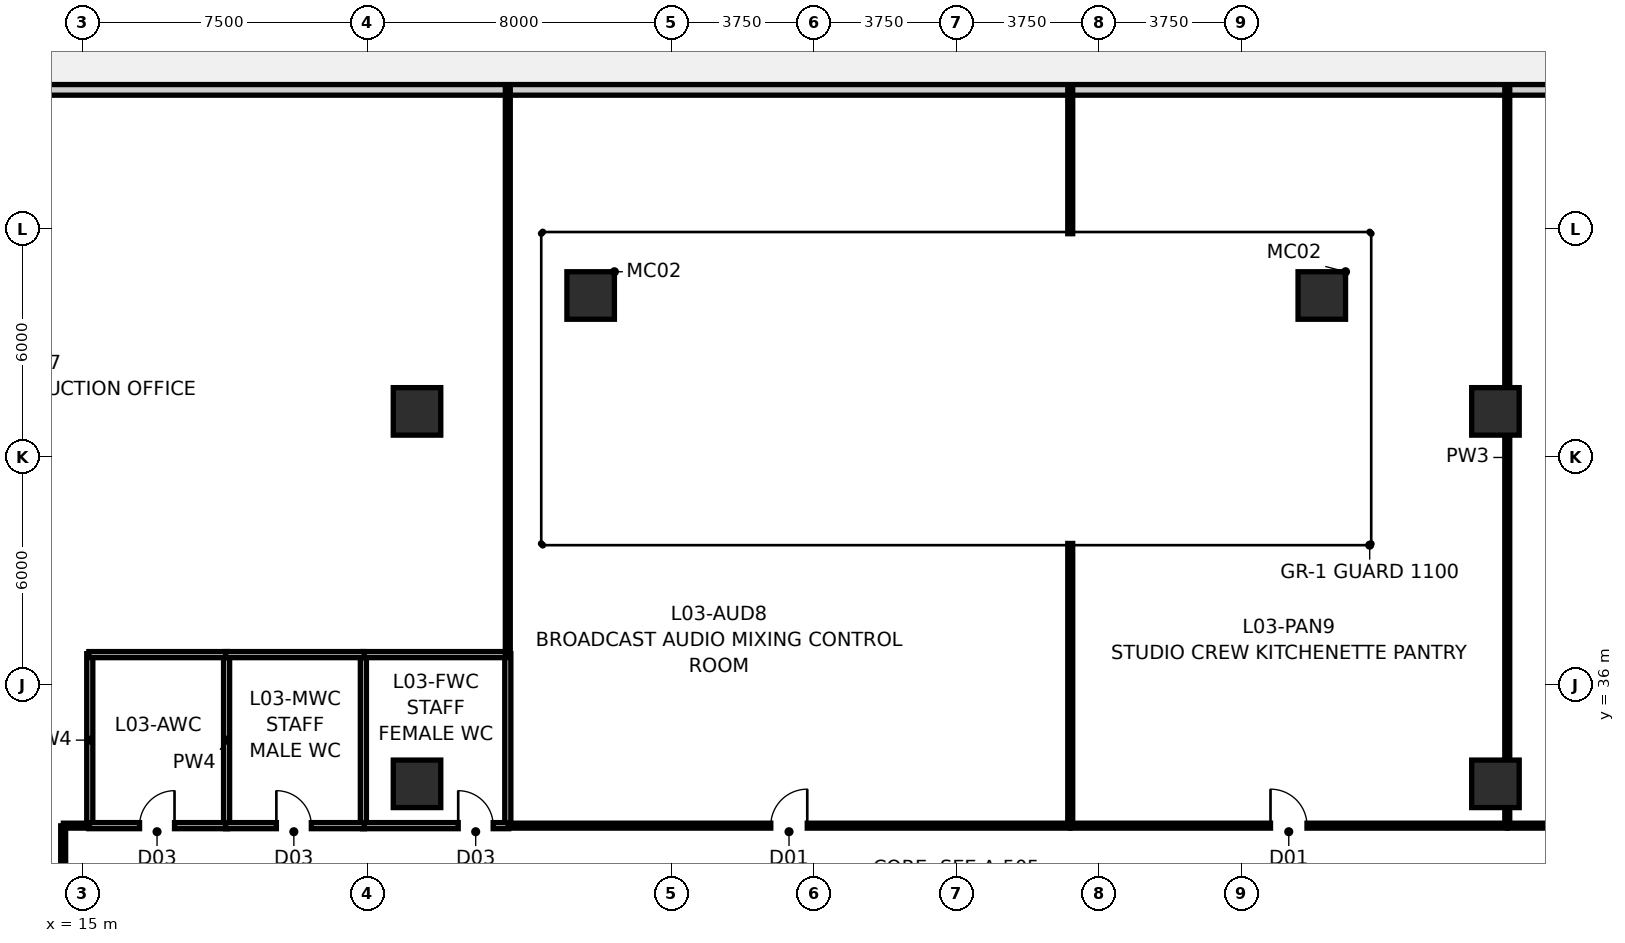
"""IFC4 building model, lengths in metres.
Left out: names, types, materials, properties, quantities, classifications, styles, units other than length and angle.
Written with IfcOpenShell. Run it as: python <this file> out.ifc"""

import sys

from ifc_helpers import new_model, si_unit, direction, frame, frame_2d, origin, origin_2d, place, context, subcontext, project, spatial, rectangle, hollow_rectangle, extrude, source, transform, mapped, element, fill, save


model = new_model("IFC4")
c1 = context("Model", 3, precision=1e-05, world=origin(), true_north=direction((0.0, 1.0)))
c2 = subcontext(c1, "Body", "Model", "MODEL_VIEW")
j1 = project(units=[si_unit("LENGTHUNIT", "METRE"), si_unit("PLANEANGLEUNIT", "RADIAN")], contexts=[c1])
p1 = place(None, origin())
s1 = spatial("IfcSite", under=j1, at=p1, CompositionType="ELEMENT")
p2 = place(p1, origin())
s2 = spatial("IfcBuilding", under=s1, at=p2, CompositionType="ELEMENT")
p3 = place(p2, frame((0.0, 0.0, 14.7)))
s3 = spatial("IfcBuildingStorey", under=s2, at=p3, CompositionType="ELEMENT", Elevation=14.7)
m1 = source(origin(), c2, "Body", "SweptSolid", [
    extrude(hollow_rectangle(XDim=1.25, YDim=1.25, WallThickness=0.07, at=origin_2d()), origin(), (0.0, 0.0, 1.0), 4.201),
])
for number, where, z_axis, x_axis in (
    (1, (47.62, 46.249, 0.0), (-0.024, 0.002, 1.0), (-0.073, -0.997, 0.0)),
    (2, (28.38, 46.249, 0.0), (0.024, 0.002, 1.0), (-0.073, 0.997, 0.0)),
):
    element("IfcColumn", number, at=place(p3, frame(where, z_axis=z_axis, x_axis=x_axis)), inside=s3, PredefinedType="COLUMN", context=c2, shape_type="MappedRepresentation", body=[
        mapped(m1, transform((0.0, 0.0, 0.0), scale=1.0)),
    ])
m2 = source(origin(), c2, "Body", "SweptSolid", [
    extrude(hollow_rectangle(XDim=1.25, YDim=1.25, WallThickness=0.07, at=origin_2d()), origin(), (0.0, 0.0, 1.0), 4.2),
])
for number, where, z_axis, x_axis in (
    (3, (23.811, 33.4, 0.0), (0.0, 0.0, 1.0), (1.0, 0.0, 0.0)),
    (4, (23.811, 43.2, 0.0), (0.0, 0.0, 1.0), (1.0, 0.0, 0.0)),
    (5, (52.189, 33.4, 0.0), (0.0, 0.0, 1.0), (1.0, 0.0, 0.0)),
    (6, (52.189, 43.2, 0.0), (0.0, 0.0, 1.0), (1.0, 0.0, 0.0)),
):
    element("IfcColumn", number, at=place(p3, frame(where, z_axis=z_axis, x_axis=x_axis)), inside=s3, PredefinedType="COLUMN", context=c2, shape_type="MappedRepresentation", body=[
        mapped(m2, transform((0.0, 0.0, 0.0), scale=1.0)),
    ])
p4 = place(p3, frame((8.861, 51.66, 0.0), z_axis=(0.0, 0.0, 1.0), x_axis=(1.0, 0.0, 0.0)))
e7 = element("IfcWall", 7, at=p4, inside=s3, PredefinedType="STANDARD", context=c2, shape_type="SweptSolid", body=[
    extrude(rectangle(XDim=58.878, YDim=0.28, at=frame_2d((29.439, 0.0))), origin(), (0.0, 0.0, 1.0), 3.88),
])
for number, where, z_axis, x_axis in (
    (8, (15.2, 32.275, 0.0), (0.0, 0.0, 1.0), (0.0, 1.0, 0.0)),
    (9, (18.8, 32.275, 0.0), (0.0, 0.0, 1.0), (0.0, 1.0, 0.0)),
    (10, (22.4, 32.275, 0.0), (0.0, 0.0, 1.0), (0.0, 1.0, 0.0)),
    (11, (26.2, 32.275, 0.0), (0.0, 0.0, 1.0), (0.0, 1.0, 0.0)),
):
    element("IfcWall", number, at=place(p3, frame(where, z_axis=z_axis, x_axis=x_axis)), inside=s3, PredefinedType="PLUMBINGWALL", context=c2, shape_type="SweptSolid", body=[
        extrude(rectangle(XDim=4.55, YDim=0.16, at=frame_2d((2.275, 0.0))), origin(), (0.0, 0.0, 1.0), 3.88),
    ])
p5 = place(p3, frame((22.375, 32.3, 0.0), z_axis=(0.0, 0.0, 1.0), x_axis=(1.0, 0.0, 0.0)))
e12 = element("IfcWall", 12, at=p5, inside=s3, PredefinedType="PLUMBINGWALL", context=c2, shape_type="SweptSolid", body=[
    extrude(rectangle(XDim=3.85, YDim=0.16, at=frame_2d((1.925, 0.0))), origin(), (0.0, 0.0, 1.0), 3.88),
])
p6 = place(p5, frame((2.52, 0.0, 0.0)))
e13 = element("IfcOpeningElement", 13, at=p6, cuts=e12, PredefinedType="OPENING", context=c2, shape_type="SweptSolid", body=[
    extrude(rectangle(XDim=0.92, YDim=2.1, at=frame_2d((0.46, 1.05))), frame((0.0, 0.092, 0.0), z_axis=(0.0, -1.0, 0.0), x_axis=(1.0, 0.0, 0.0)), (0.0, 0.0, 1.0), 0.184),
])
p7 = place(p3, frame((22.375, 36.8, 0.0), z_axis=(0.0, 0.0, 1.0), x_axis=(1.0, 0.0, 0.0)))
e14 = element("IfcWall", 14, at=p7, inside=s3, PredefinedType="PLUMBINGWALL", context=c2, shape_type="SweptSolid", body=[
    extrude(rectangle(XDim=3.85, YDim=0.16, at=frame_2d((1.925, 0.0))), origin(), (0.0, 0.0, 1.0), 3.459),
])
p8 = place(p3, frame((15.175, 32.3, 0.0), z_axis=(0.0, 0.0, 1.0), x_axis=(1.0, 0.0, 0.0)))
e15 = element("IfcWall", 15, at=p8, inside=s3, PredefinedType="PLUMBINGWALL", context=c2, shape_type="SweptSolid", body=[
    extrude(rectangle(XDim=3.65, YDim=0.16, at=frame_2d((1.825, 0.0))), origin(), (0.0, 0.0, 1.0), 3.88),
])
p9 = place(p8, frame((1.335, 0.0, 0.0)))
e16 = element("IfcOpeningElement", 16, at=p9, cuts=e15, PredefinedType="OPENING", context=c2, shape_type="SweptSolid", body=[
    extrude(rectangle(XDim=0.92, YDim=2.1, at=frame_2d((0.46, 1.05))), frame((0.0, 0.092, 0.0), z_axis=(0.0, -1.0, 0.0), x_axis=(1.0, 0.0, 0.0)), (0.0, 0.0, 1.0), 0.184),
])
p10 = place(p3, frame((15.175, 36.8, 0.0), z_axis=(0.0, 0.0, 1.0), x_axis=(1.0, 0.0, 0.0)))
e17 = element("IfcWall", 17, at=p10, inside=s3, PredefinedType="PLUMBINGWALL", context=c2, shape_type="SweptSolid", body=[
    extrude(rectangle(XDim=3.65, YDim=0.16, at=frame_2d((1.825, 0.0))), origin(), (0.0, 0.0, 1.0), 3.88),
])
p11 = place(p3, frame((18.775, 32.3, 0.0), z_axis=(0.0, 0.0, 1.0), x_axis=(1.0, 0.0, 0.0)))
e18 = element("IfcWall", 18, at=p11, inside=s3, PredefinedType="PLUMBINGWALL", context=c2, shape_type="SweptSolid", body=[
    extrude(rectangle(XDim=3.65, YDim=0.16, at=frame_2d((1.825, 0.0))), origin(), (0.0, 0.0, 1.0), 3.88),
])
p12 = place(p11, frame((1.335, 0.0, 0.0)))
e19 = element("IfcOpeningElement", 19, at=p12, cuts=e18, PredefinedType="OPENING", context=c2, shape_type="SweptSolid", body=[
    extrude(rectangle(XDim=0.92, YDim=2.1, at=frame_2d((0.46, 1.05))), frame((0.0, 0.092, 0.0), z_axis=(0.0, -1.0, 0.0), x_axis=(1.0, 0.0, 0.0)), (0.0, 0.0, 1.0), 0.184),
])
p13 = place(p3, frame((18.775, 36.8, 0.0), z_axis=(0.0, 0.0, 1.0), x_axis=(1.0, 0.0, 0.0)))
e20 = element("IfcWall", 20, at=p13, inside=s3, PredefinedType="PLUMBINGWALL", context=c2, shape_type="SweptSolid", body=[
    extrude(rectangle(XDim=3.65, YDim=0.16, at=frame_2d((1.825, 0.0))), origin(), (0.0, 0.0, 1.0), 3.88),
])
p14 = place(p3, frame((52.5, 32.305, 0.0), z_axis=(0.0, 0.0, 1.0), x_axis=(0.0, 1.0, 0.0)))
e21 = element("IfcWall", 21, at=p14, inside=s3, PredefinedType="PARTITIONING", context=c2, shape_type="SweptSolid", body=[
    extrude(rectangle(XDim=19.365, YDim=0.13, at=frame_2d((9.683, 0.0))), origin(), (0.0, 0.0, 1.0), 2.865),
])
p15 = place(p3, frame((26.2, 36.805, 0.0), z_axis=(0.0, 0.0, 1.0), x_axis=(0.0, 1.0, 0.0)))
e22 = element("IfcWall", 22, at=p15, inside=s3, PredefinedType="PARTITIONING", context=c2, shape_type="SweptSolid", body=[
    extrude(rectangle(XDim=14.865, YDim=0.13, at=frame_2d((7.433, 0.0))), origin(), (0.0, 0.0, 1.0), 3.88),
])
p16 = place(p3, frame((26.205, 32.3, 0.0), z_axis=(0.0, 0.0, 1.0), x_axis=(1.0, 0.0, 0.0)))
e23 = element("IfcWall", 23, at=p16, inside=s3, PredefinedType="PARTITIONING", context=c2, shape_type="SweptSolid", body=[
    extrude(rectangle(XDim=14.79, YDim=0.13, at=frame_2d((7.395, 0.0))), origin(), (0.0, 0.0, 1.0), 3.88),
])
p17 = place(p16, frame((6.915, 0.0, 0.0)))
e24 = element("IfcOpeningElement", 24, at=p17, cuts=e23, PredefinedType="OPENING", context=c2, shape_type="SweptSolid", body=[
    extrude(rectangle(XDim=0.96, YDim=2.15, at=frame_2d((0.48, 1.075))), frame((0.0, 0.077, 0.0), z_axis=(0.0, -1.0, 0.0), x_axis=(1.0, 0.0, 0.0)), (0.0, 0.0, 1.0), 0.154),
])
p18 = place(p3, frame((41.005, 32.3, 0.0), z_axis=(0.0, 0.0, 1.0), x_axis=(1.0, 0.0, 0.0)))
e25 = element("IfcWall", 25, at=p18, inside=s3, PredefinedType="PARTITIONING", context=c2, shape_type="SweptSolid", body=[
    extrude(rectangle(XDim=11.49, YDim=0.13, at=frame_2d((5.745, 0.0))), origin(), (0.0, 0.0, 1.0), 3.88),
])
p19 = place(p18, frame((5.265, 0.0, 0.0)))
e26 = element("IfcOpeningElement", 26, at=p19, cuts=e25, PredefinedType="OPENING", context=c2, shape_type="SweptSolid", body=[
    extrude(rectangle(XDim=0.96, YDim=2.15, at=frame_2d((0.48, 1.075))), frame((0.0, 0.077, 0.0), z_axis=(0.0, -1.0, 0.0), x_axis=(1.0, 0.0, 0.0)), (0.0, 0.0, 1.0), 0.154),
])
p20 = place(p3, frame((52.505, 32.3, 0.0), z_axis=(0.0, 0.0, 1.0), x_axis=(1.0, 0.0, 0.0)))
e27 = element("IfcWall", 27, at=p20, inside=s3, PredefinedType="PARTITIONING", context=c2, shape_type="SweptSolid", body=[
    extrude(rectangle(XDim=8.99, YDim=0.13, at=frame_2d((4.495, 0.0))), origin(), (0.0, 0.0, 1.0), 3.88),
])
p21 = place(p3, frame((41.0, 32.305, 0.0), z_axis=(0.0, 0.0, 1.0), x_axis=(0.0, 1.0, 0.0)))
e28 = element("IfcWall", 28, at=p21, inside=s3, PredefinedType="PARTITIONING", context=c2, shape_type="SweptSolid", body=[
    extrude(rectangle(XDim=7.42, YDim=0.13, at=frame_2d((3.71, 0.0))), origin(), (0.0, 0.0, 1.0), 3.88),
])
p22 = place(p3, frame((41.0, 47.875, 0.0), z_axis=(0.0, 0.0, 1.0), x_axis=(0.0, 1.0, 0.0)))
e29 = element("IfcWall", 29, at=p22, inside=s3, PredefinedType="PARTITIONING", context=c2, shape_type="SweptSolid", body=[
    extrude(rectangle(XDim=3.795, YDim=0.13, at=frame_2d((1.897, 0.0))), origin(), (0.0, 0.0, 1.0), 3.88),
])
p23 = place(p3, frame((14.5, 30.105, 0.0), z_axis=(0.0, 0.0, 1.0), x_axis=(0.0, 1.0, 0.0)))
e30 = element("IfcWall", 30, at=p23, inside=s3, PredefinedType="PARTITIONING", context=c2, shape_type="SweptSolid", body=[
    extrude(rectangle(XDim=2.19, YDim=0.13, at=frame_2d((1.095, 0.0))), origin(), (0.0, 0.0, 1.0), 3.88),
])
p24 = place(p3, frame((14.505, 32.3, 0.0), z_axis=(0.0, 0.0, 1.0), x_axis=(1.0, 0.0, 0.0)))
e31 = element("IfcWall", 31, at=p24, inside=s3, PredefinedType="PARTITIONING", context=c2, shape_type="SweptSolid", body=[
    extrude(rectangle(XDim=0.69, YDim=0.13, at=frame_2d((0.345, 0.0))), origin(), (0.0, 0.0, 1.0), 3.88),
])
p25 = place(p6, origin())
e32 = element("IfcDoor", 32, at=p25, inside=s3, OperationType="SINGLE_SWING_LEFT", PredefinedType="DOOR", context=c2, shape_type="SweptSolid", body=[
    extrude(rectangle(XDim=0.92, YDim=2.1, at=frame_2d((0.46, 1.05))), frame((0.0, 0.025, 0.0), z_axis=(0.0, -1.0, 0.0), x_axis=(1.0, 0.0, 0.0)), (0.0, 0.0, 1.0), 0.05),
])
fill(e13, e32)
p26 = place(p9, origin())
e33 = element("IfcDoor", 33, at=p26, inside=s3, OperationType="SINGLE_SWING_RIGHT", PredefinedType="DOOR", context=c2, shape_type="SweptSolid", body=[
    extrude(rectangle(XDim=0.92, YDim=2.1, at=frame_2d((0.46, 1.05))), frame((0.0, 0.025, 0.0), z_axis=(0.0, -1.0, 0.0), x_axis=(1.0, 0.0, 0.0)), (0.0, 0.0, 1.0), 0.05),
])
fill(e16, e33)
p27 = place(p12, origin())
e34 = element("IfcDoor", 34, at=p27, inside=s3, OperationType="SINGLE_SWING_LEFT", PredefinedType="DOOR", context=c2, shape_type="SweptSolid", body=[
    extrude(rectangle(XDim=0.92, YDim=2.1, at=frame_2d((0.46, 1.05))), frame((0.0, 0.025, 0.0), z_axis=(0.0, -1.0, 0.0), x_axis=(1.0, 0.0, 0.0)), (0.0, 0.0, 1.0), 0.05),
])
fill(e19, e34)
p28 = place(p17, origin())
e35 = element("IfcDoor", 35, at=p28, inside=s3, OperationType="SINGLE_SWING_RIGHT", PredefinedType="DOOR", context=c2, shape_type="SweptSolid", body=[
    extrude(rectangle(XDim=0.96, YDim=2.15, at=frame_2d((0.48, 1.075))), frame((0.0, 0.025, 0.0), z_axis=(0.0, -1.0, 0.0), x_axis=(1.0, 0.0, 0.0)), (0.0, 0.0, 1.0), 0.05),
])
fill(e24, e35)
p29 = place(p19, origin())
e36 = element("IfcDoor", 36, at=p29, inside=s3, OperationType="SINGLE_SWING_LEFT", PredefinedType="DOOR", context=c2, shape_type="SweptSolid", body=[
    extrude(rectangle(XDim=0.96, YDim=2.15, at=frame_2d((0.48, 1.075))), frame((0.0, 0.025, 0.0), z_axis=(0.0, -1.0, 0.0), x_axis=(1.0, 0.0, 0.0)), (0.0, 0.0, 1.0), 0.05),
])
fill(e26, e36)
save(model, sys.argv[1])
